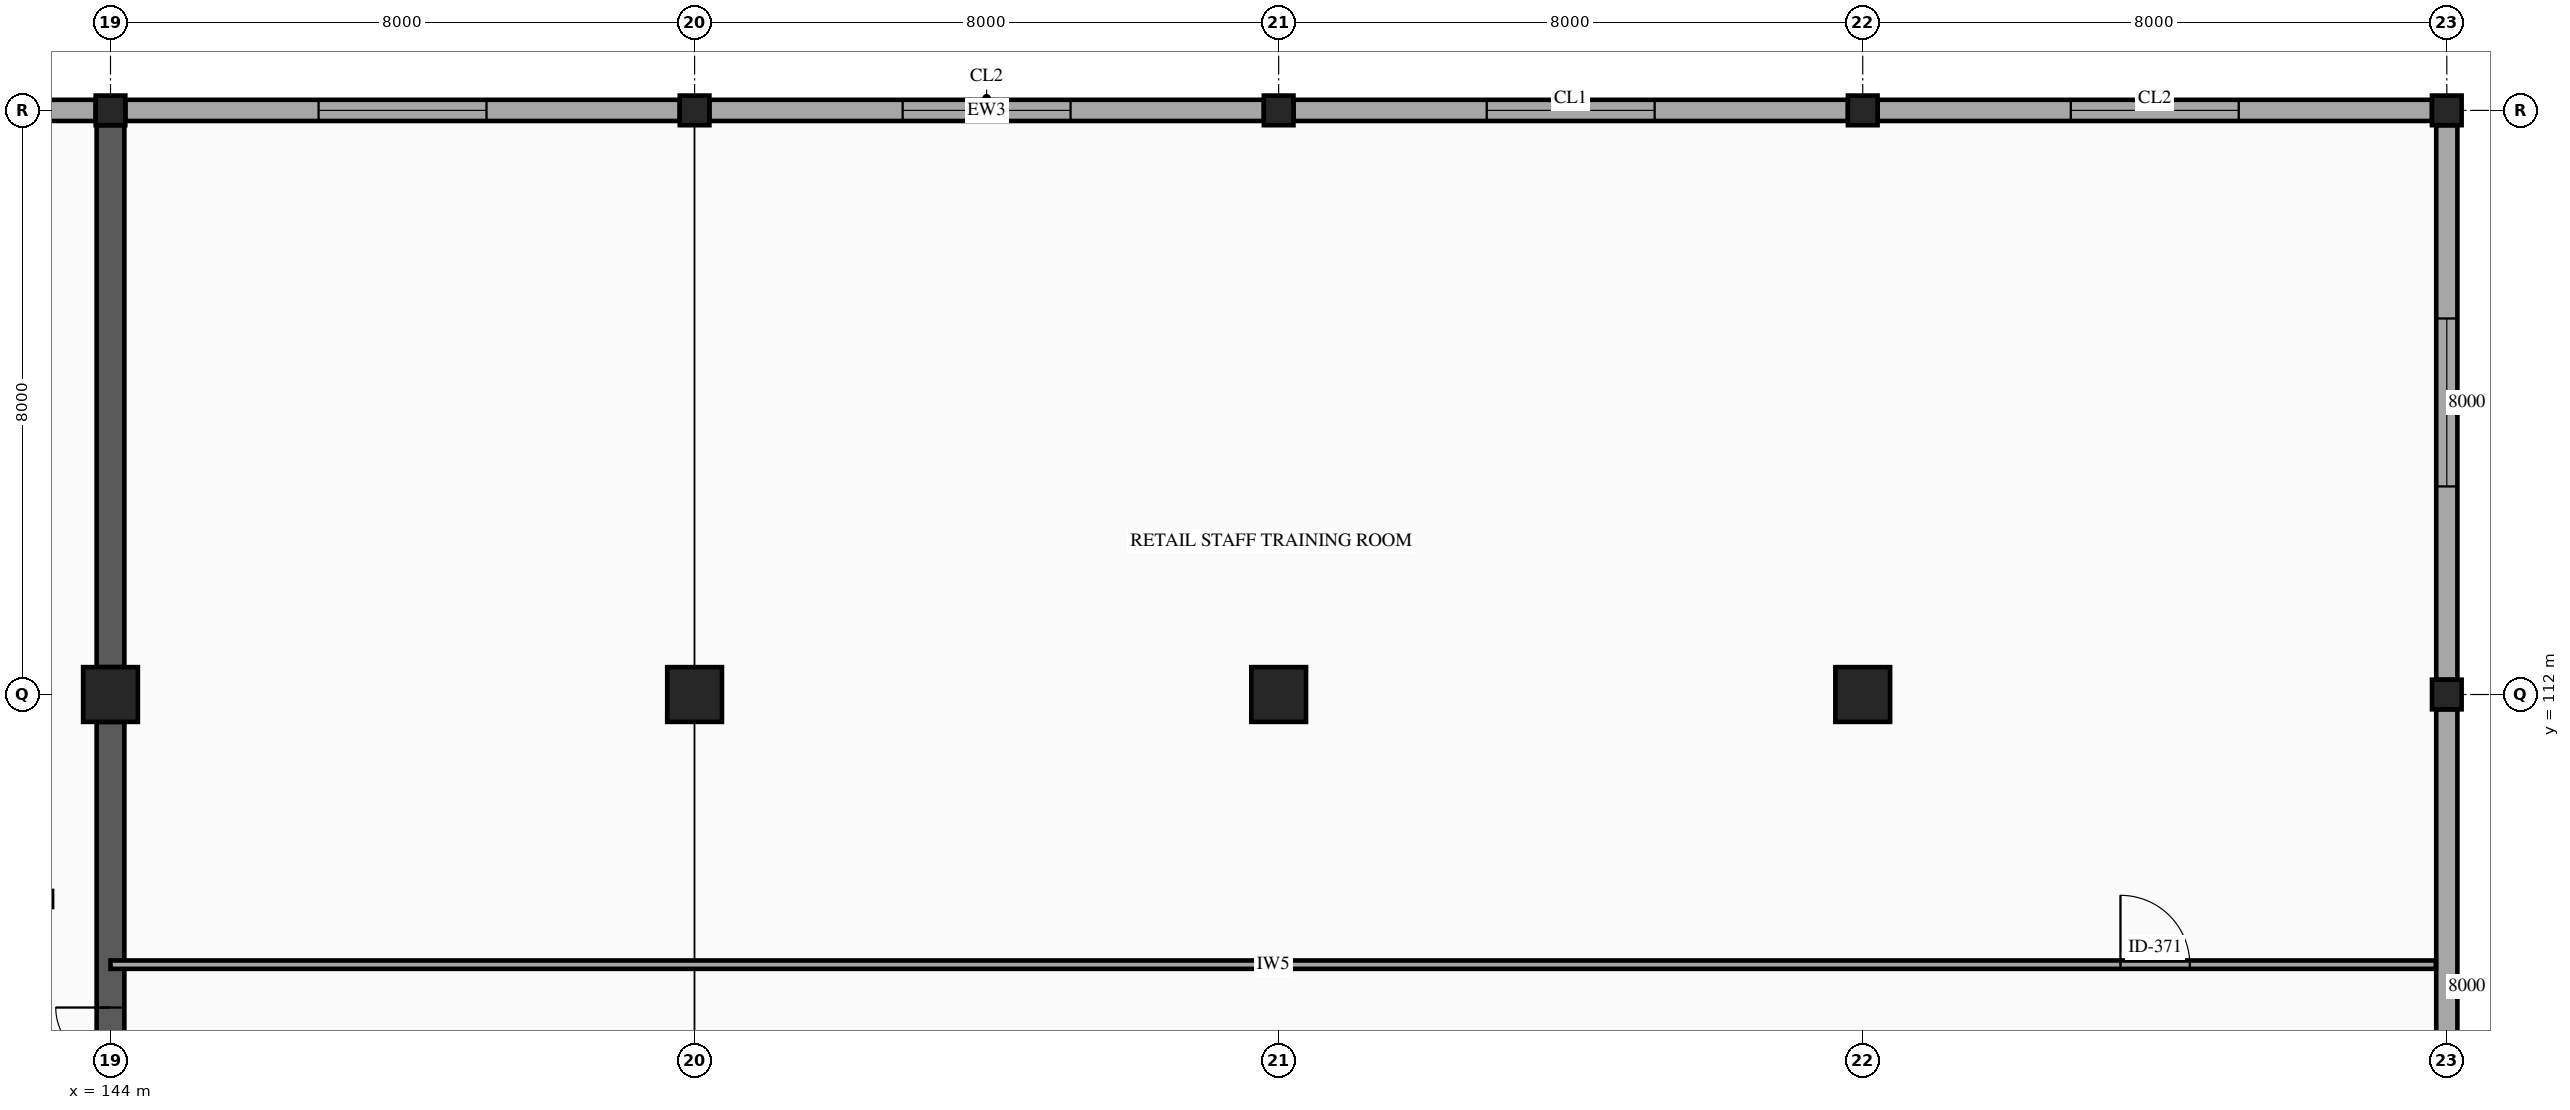
"""IFC4 building model, lengths in metres.
Left out: names, types, materials, properties, quantities, classifications, styles, units other than length and angle.
Written with IfcOpenShell. Run it as: python <this file> out.ifc"""

import sys

from ifc_helpers import new_model, si_unit, direction, frame, frame_2d, origin, origin_2d, place, context, subcontext, project, spatial, rectangle, hollow_rectangle, extrude, element, fill, save


model = new_model("IFC4")
c1 = context("Model", 3, precision=1e-05, world=origin(), true_north=direction((0.0, 1.0)))
c2 = subcontext(c1, "Body", "Model", "MODEL_VIEW")
j1 = project(units=[si_unit("LENGTHUNIT", "METRE"), si_unit("PLANEANGLEUNIT", "RADIAN")], contexts=[c1])
p1 = place(None, origin())
s1 = spatial("IfcSite", under=j1, at=p1, CompositionType="ELEMENT")
p2 = place(p1, origin())
s2 = spatial("IfcBuilding", under=s1, at=p2, CompositionType="ELEMENT")
p3 = place(p2, frame((0.0, 0.0, 23.9)))
s3 = spatial("IfcBuildingStorey", under=s2, at=p3, CompositionType="ELEMENT", Elevation=23.9)
p4 = place(p3, frame((144.0, 112.0, 0.0), z_axis=(0.0, 0.0, 1.0), x_axis=(1.0, 0.0, 0.0)))
e1 = element("IfcColumn", 1, at=p4, inside=s3, PredefinedType="COLUMN", context=c2, shape_type="SweptSolid", body=[
    extrude(rectangle(XDim=0.75, YDim=0.75, at=origin_2d()), origin(), (0.0, 0.0, 1.0), 4.5),
])
p5 = place(p3, frame((144.0, 120.0, 0.0), z_axis=(0.0, 0.0, 1.0), x_axis=(1.0, 0.0, 0.0)))
e2 = element("IfcColumn", 2, at=p5, inside=s3, PredefinedType="COLUMN", context=c2, shape_type="SweptSolid", body=[
    extrude(hollow_rectangle(XDim=0.406, YDim=0.406, WallThickness=0.015, InnerFilletRadius=0.015, OuterFilletRadius=0.029, at=origin_2d()), origin(), (0.0, 0.0, 1.0), 4.5),
])
p6 = place(p3, frame((152.0, 112.0, 0.0), z_axis=(0.0, 0.0, 1.0), x_axis=(1.0, 0.0, 0.0)))
e3 = element("IfcColumn", 3, at=p6, inside=s3, PredefinedType="COLUMN", context=c2, shape_type="SweptSolid", body=[
    extrude(rectangle(XDim=0.75, YDim=0.75, at=origin_2d()), origin(), (0.0, 0.0, 1.0), 4.5),
])
p7 = place(p3, frame((152.0, 120.0, 0.0), z_axis=(0.0, 0.0, 1.0), x_axis=(1.0, 0.0, 0.0)))
e4 = element("IfcColumn", 4, at=p7, inside=s3, PredefinedType="COLUMN", context=c2, shape_type="SweptSolid", body=[
    extrude(hollow_rectangle(XDim=0.406, YDim=0.406, WallThickness=0.015, InnerFilletRadius=0.015, OuterFilletRadius=0.029, at=origin_2d()), origin(), (0.0, 0.0, 1.0), 4.5),
])
p8 = place(p3, frame((160.0, 112.0, 0.0), z_axis=(0.0, 0.0, 1.0), x_axis=(1.0, 0.0, 0.0)))
e5 = element("IfcColumn", 5, at=p8, inside=s3, PredefinedType="COLUMN", context=c2, shape_type="SweptSolid", body=[
    extrude(rectangle(XDim=0.75, YDim=0.75, at=origin_2d()), origin(), (0.0, 0.0, 1.0), 4.5),
])
p9 = place(p3, frame((160.0, 120.0, 0.0), z_axis=(0.0, 0.0, 1.0), x_axis=(1.0, 0.0, 0.0)))
e6 = element("IfcColumn", 6, at=p9, inside=s3, PredefinedType="COLUMN", context=c2, shape_type="SweptSolid", body=[
    extrude(hollow_rectangle(XDim=0.406, YDim=0.406, WallThickness=0.015, InnerFilletRadius=0.015, OuterFilletRadius=0.029, at=origin_2d()), origin(), (0.0, 0.0, 1.0), 4.5),
])
p10 = place(p3, frame((168.0, 112.0, 0.0), z_axis=(0.0, 0.0, 1.0), x_axis=(1.0, 0.0, 0.0)))
e7 = element("IfcColumn", 7, at=p10, inside=s3, PredefinedType="COLUMN", context=c2, shape_type="SweptSolid", body=[
    extrude(rectangle(XDim=0.75, YDim=0.75, at=origin_2d()), origin(), (0.0, 0.0, 1.0), 4.5),
])
for number, where, z_axis, x_axis in (
    (8, (168.0, 120.0, 0.0), (0.0, 0.0, 1.0), (1.0, 0.0, 0.0)),
    (9, (176.0, 112.0, 0.0), (0.0, 0.0, 1.0), (1.0, 0.0, 0.0)),
    (10, (176.0, 120.0, 0.0), (0.0, 0.0, 1.0), (1.0, 0.0, 0.0)),
):
    element("IfcColumn", number, at=place(p3, frame(where, z_axis=z_axis, x_axis=x_axis)), inside=s3, PredefinedType="COLUMN", context=c2, shape_type="SweptSolid", body=[
        extrude(hollow_rectangle(XDim=0.406, YDim=0.406, WallThickness=0.015, InnerFilletRadius=0.015, OuterFilletRadius=0.029, at=origin_2d()), origin(), (0.0, 0.0, 1.0), 4.5),
    ])
p11 = place(p3, frame((152.203, 120.0, 0.0), z_axis=(0.0, 0.0, 1.0), x_axis=(1.0, 0.0, 0.0)))
e11 = element("IfcWall", 11, at=p11, inside=s3, PredefinedType="STANDARD", context=c2, shape_type="SweptSolid", body=[
    extrude(rectangle(XDim=7.594, YDim=0.29, at=frame_2d((3.797, 0.0))), origin(), (0.0, 0.0, 1.0), 3.48),
])
p12 = place(p11, frame((2.647, 0.0, 0.8)))
e12 = element("IfcOpeningElement", 12, at=p12, cuts=e11, PredefinedType="OPENING", context=c2, shape_type="SweptSolid", body=[
    extrude(rectangle(XDim=2.3, YDim=1.75, at=frame_2d((1.15, 0.875))), frame((0.0, 0.155, 0.0), z_axis=(0.0, -1.0, 0.0), x_axis=(1.0, 0.0, 0.0)), (0.0, 0.0, 1.0), 0.31),
])
p13 = place(p3, frame((160.203, 120.0, 0.0), z_axis=(0.0, 0.0, 1.0), x_axis=(1.0, 0.0, 0.0)))
e13 = element("IfcWall", 13, at=p13, inside=s3, PredefinedType="STANDARD", context=c2, shape_type="SweptSolid", body=[
    extrude(rectangle(XDim=7.594, YDim=0.29, at=frame_2d((3.797, 0.0))), origin(), (0.0, 0.0, 1.0), 3.48),
])
p14 = place(p13, frame((2.647, 0.0, 0.8)))
e14 = element("IfcOpeningElement", 14, at=p14, cuts=e13, PredefinedType="OPENING", context=c2, shape_type="SweptSolid", body=[
    extrude(rectangle(XDim=2.3, YDim=1.75, at=frame_2d((1.15, 0.875))), frame((0.0, 0.155, 0.0), z_axis=(0.0, -1.0, 0.0), x_axis=(1.0, 0.0, 0.0)), (0.0, 0.0, 1.0), 0.31),
])
p15 = place(p3, frame((168.203, 120.0, 0.0), z_axis=(0.0, 0.0, 1.0), x_axis=(1.0, 0.0, 0.0)))
e15 = element("IfcWall", 15, at=p15, inside=s3, PredefinedType="STANDARD", context=c2, shape_type="SweptSolid", body=[
    extrude(rectangle(XDim=7.594, YDim=0.29, at=frame_2d((3.797, 0.0))), origin(), (0.0, 0.0, 1.0), 3.48),
])
p16 = place(p15, frame((2.647, 0.0, 0.8)))
e16 = element("IfcOpeningElement", 16, at=p16, cuts=e15, PredefinedType="OPENING", context=c2, shape_type="SweptSolid", body=[
    extrude(rectangle(XDim=2.3, YDim=1.75, at=frame_2d((1.15, 0.875))), frame((0.0, 0.155, 0.0), z_axis=(0.0, -1.0, 0.0), x_axis=(1.0, 0.0, 0.0)), (0.0, 0.0, 1.0), 0.31),
])
p17 = place(p3, frame((176.0, 119.797, 0.0), z_axis=(0.0, 0.0, 1.0), x_axis=(0.0, -1.0, 0.0)))
e17 = element("IfcWall", 17, at=p17, inside=s3, PredefinedType="STANDARD", context=c2, shape_type="SweptSolid", body=[
    extrude(rectangle(XDim=7.594, YDim=0.29, at=frame_2d((3.797, 0.0))), origin(), (0.0, 0.0, 1.0), 3.48),
])
p18 = place(p17, frame((2.647, 0.0, 0.8)))
e18 = element("IfcOpeningElement", 18, at=p18, cuts=e17, PredefinedType="OPENING", context=c2, shape_type="SweptSolid", body=[
    extrude(rectangle(XDim=2.3, YDim=1.75, at=frame_2d((1.15, 0.875))), frame((0.0, 0.155, 0.0), z_axis=(0.0, -1.0, 0.0), x_axis=(1.0, 0.0, 0.0)), (0.0, 0.0, 1.0), 0.31),
])
for number, where, z_axis, x_axis in (
    (19, (176.0, 111.797, 0.0), (0.0, 0.0, 1.0), (0.0, -1.0, 0.0)),
    (20, (136.203, 120.0, 0.0), (0.0, 0.0, 1.0), (1.0, 0.0, 0.0)),
):
    element("IfcWall", number, at=place(p3, frame(where, z_axis=z_axis, x_axis=x_axis)), inside=s3, PredefinedType="STANDARD", context=c2, shape_type="SweptSolid", body=[
        extrude(rectangle(XDim=7.594, YDim=0.29, at=frame_2d((3.797, 0.0))), origin(), (0.0, 0.0, 1.0), 3.48),
    ])
p19 = place(p3, frame((144.203, 120.0, 0.0), z_axis=(0.0, 0.0, 1.0), x_axis=(1.0, 0.0, 0.0)))
e21 = element("IfcWall", 21, at=p19, inside=s3, PredefinedType="STANDARD", context=c2, shape_type="SweptSolid", body=[
    extrude(rectangle(XDim=7.594, YDim=0.29, at=frame_2d((3.797, 0.0))), origin(), (0.0, 0.0, 1.0), 3.48),
])
p20 = place(p19, frame((2.647, 0.0, 0.8)))
e22 = element("IfcOpeningElement", 22, at=p20, cuts=e21, PredefinedType="OPENING", context=c2, shape_type="SweptSolid", body=[
    extrude(rectangle(XDim=2.3, YDim=1.75, at=frame_2d((1.15, 0.875))), frame((0.0, 0.155, 0.0), z_axis=(0.0, -1.0, 0.0), x_axis=(1.0, 0.0, 0.0)), (0.0, 0.0, 1.0), 0.31),
])
p21 = place(p3, frame((144.0, 104.375, 0.0), z_axis=(0.0, 0.0, 1.0), x_axis=(0.0, 1.0, 0.0)))
e23 = element("IfcWall", 23, at=p21, inside=s3, PredefinedType="SHEAR", context=c2, shape_type="SweptSolid", body=[
    extrude(rectangle(XDim=7.25, YDim=0.38, at=frame_2d((3.625, 0.0))), origin(), (0.0, 0.0, 1.0), 4.28),
])
p22 = place(p21, frame((1.838, 0.0, 0.0)))
e24 = element("IfcOpeningElement", 24, at=p22, cuts=e23, PredefinedType="OPENING", context=c2, shape_type="SweptSolid", body=[
    extrude(rectangle(XDim=1.5, YDim=2.15, at=frame_2d((0.75, 1.075))), frame((0.0, 0.2, 0.0), z_axis=(0.0, -1.0, 0.0), x_axis=(1.0, 0.0, 0.0)), (0.0, 0.0, 1.0), 0.4),
])
p23 = place(p3, frame((144.0, 112.375, 0.0), z_axis=(0.0, 0.0, 1.0), x_axis=(0.0, 1.0, 0.0)))
e25 = element("IfcWall", 25, at=p23, inside=s3, PredefinedType="SHEAR", context=c2, shape_type="SweptSolid", body=[
    extrude(rectangle(XDim=7.422, YDim=0.38, at=frame_2d((3.711, 0.0))), origin(), (0.0, 0.0, 1.0), 4.28),
])
p24 = place(p3, frame((144.0, 108.3, 0.0), z_axis=(0.0, 0.0, 1.0), x_axis=(1.0, 0.0, 0.0)))
e26 = element("IfcWall", 26, at=p24, inside=s3, PredefinedType="PARTITIONING", context=c2, shape_type="SweptSolid", body=[
    extrude(rectangle(XDim=31.85, YDim=0.115, at=frame_2d((15.925, 0.0))), origin(), (0.0, 0.0, 1.0), 3.48),
])
p25 = place(p24, frame((27.53, 0.0, 0.0)))
e27 = element("IfcOpeningElement", 27, at=p25, cuts=e26, PredefinedType="OPENING", context=c2, shape_type="SweptSolid", body=[
    extrude(rectangle(XDim=0.95, YDim=2.1, at=frame_2d((0.475, 1.05))), frame((0.0, 0.067, 0.0), z_axis=(0.0, -1.0, 0.0), x_axis=(1.0, 0.0, 0.0)), (0.0, 0.0, 1.0), 0.135),
])
p26 = place(p12, origin())
e28 = element("IfcWindow", 28, at=p26, inside=s3, PartitioningType="DOUBLE_PANEL_VERTICAL", PredefinedType="WINDOW", context=c2, shape_type="SweptSolid", body=[
    extrude(rectangle(XDim=2.3, YDim=1.75, at=frame_2d((1.15, 0.875))), frame((0.0, 0.03, 0.0), z_axis=(0.0, -1.0, 0.0), x_axis=(1.0, 0.0, 0.0)), (0.0, 0.0, 1.0), 0.06),
])
fill(e12, e28)
p27 = place(p14, origin())
e29 = element("IfcWindow", 29, at=p27, inside=s3, PartitioningType="DOUBLE_PANEL_VERTICAL", PredefinedType="WINDOW", context=c2, shape_type="SweptSolid", body=[
    extrude(rectangle(XDim=2.3, YDim=1.75, at=frame_2d((1.15, 0.875))), frame((0.0, 0.03, 0.0), z_axis=(0.0, -1.0, 0.0), x_axis=(1.0, 0.0, 0.0)), (0.0, 0.0, 1.0), 0.06),
])
fill(e14, e29)
p28 = place(p16, origin())
e30 = element("IfcWindow", 30, at=p28, inside=s3, PartitioningType="DOUBLE_PANEL_VERTICAL", PredefinedType="WINDOW", context=c2, shape_type="SweptSolid", body=[
    extrude(rectangle(XDim=2.3, YDim=1.75, at=frame_2d((1.15, 0.875))), frame((0.0, 0.03, 0.0), z_axis=(0.0, -1.0, 0.0), x_axis=(1.0, 0.0, 0.0)), (0.0, 0.0, 1.0), 0.06),
])
fill(e16, e30)
p29 = place(p18, origin())
e31 = element("IfcWindow", 31, at=p29, inside=s3, PartitioningType="DOUBLE_PANEL_VERTICAL", PredefinedType="WINDOW", context=c2, shape_type="SweptSolid", body=[
    extrude(rectangle(XDim=2.3, YDim=1.75, at=frame_2d((1.15, 0.875))), frame((0.0, 0.03, 0.0), z_axis=(0.0, -1.0, 0.0), x_axis=(1.0, 0.0, 0.0)), (0.0, 0.0, 1.0), 0.06),
])
fill(e18, e31)
p30 = place(p20, origin())
e32 = element("IfcWindow", 32, at=p30, inside=s3, PartitioningType="DOUBLE_PANEL_VERTICAL", PredefinedType="WINDOW", context=c2, shape_type="SweptSolid", body=[
    extrude(rectangle(XDim=2.3, YDim=1.75, at=frame_2d((1.15, 0.875))), frame((0.0, 0.03, 0.0), z_axis=(0.0, -1.0, 0.0), x_axis=(1.0, 0.0, 0.0)), (0.0, 0.0, 1.0), 0.06),
])
fill(e22, e32)
p31 = place(p22, origin())
e33 = element("IfcDoor", 33, at=p31, inside=s3, OperationType="DOUBLE_DOOR_SINGLE_SWING", PredefinedType="DOOR", context=c2, shape_type="SweptSolid", body=[
    extrude(rectangle(XDim=1.5, YDim=2.15, at=frame_2d((0.75, 1.075))), frame((0.0, 0.025, 0.0), z_axis=(0.0, -1.0, 0.0), x_axis=(1.0, 0.0, 0.0)), (0.0, 0.0, 1.0), 0.05),
])
fill(e24, e33)
p32 = place(p25, origin())
e34 = element("IfcDoor", 34, at=p32, inside=s3, OperationType="SINGLE_SWING_LEFT", PredefinedType="DOOR", context=c2, shape_type="SweptSolid", body=[
    extrude(rectangle(XDim=0.95, YDim=2.1, at=frame_2d((0.475, 1.05))), frame((0.0, 0.025, 0.0), z_axis=(0.0, -1.0, 0.0), x_axis=(1.0, 0.0, 0.0)), (0.0, 0.0, 1.0), 0.05),
])
fill(e27, e34)
save(model, sys.argv[1])
